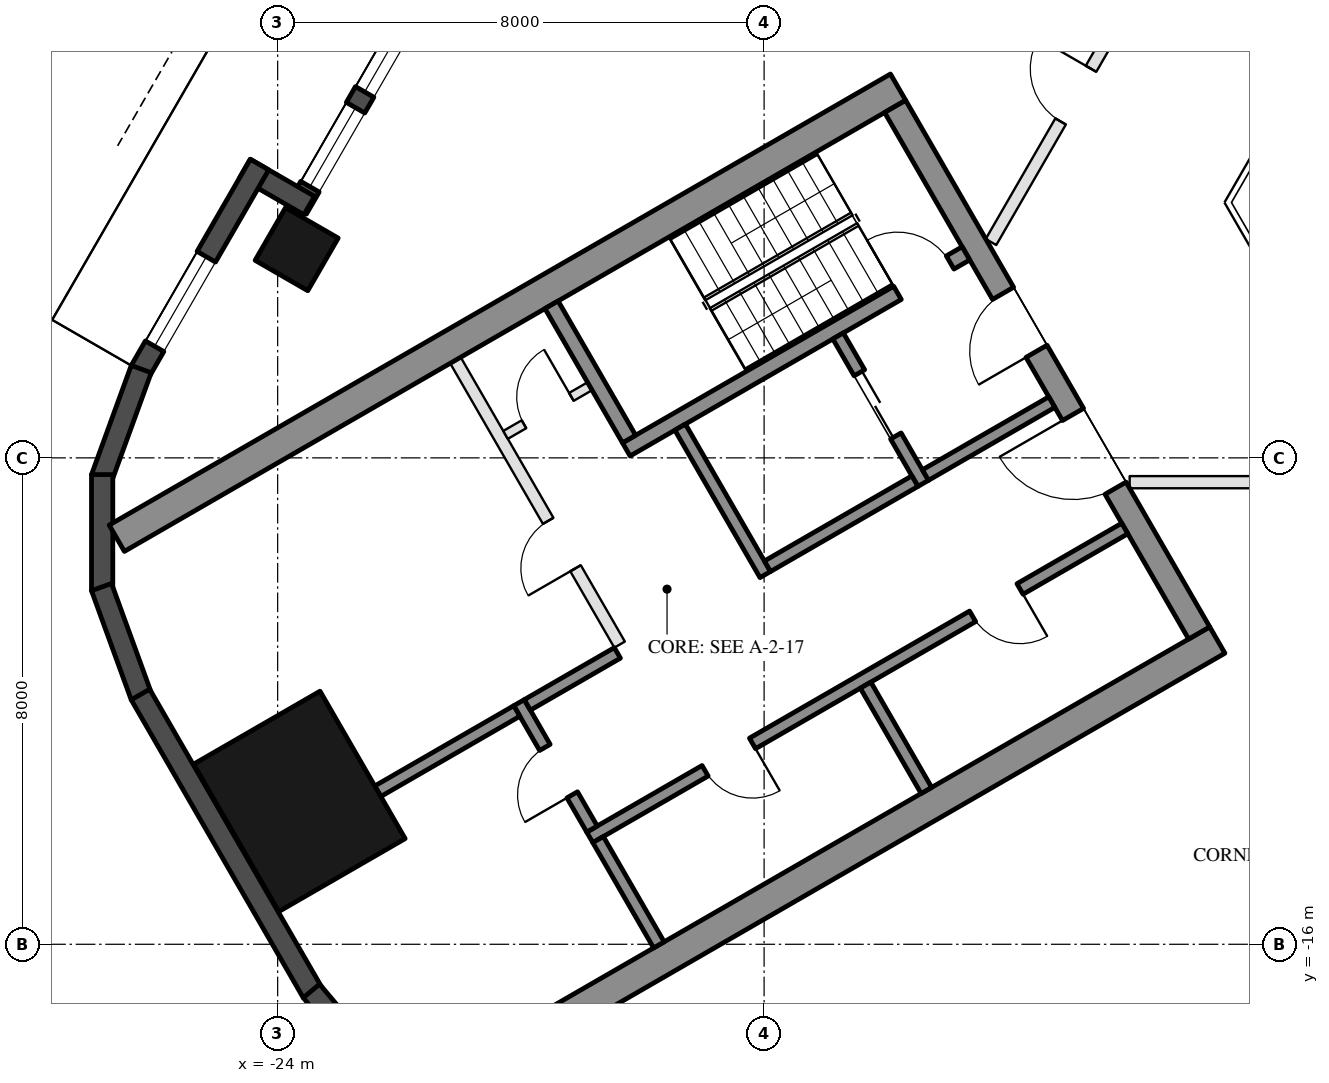
"""IFC4 building model, lengths in metres.
Left out: names, types, materials, properties, quantities, classifications, styles, units other than length and angle.
Written with IfcOpenShell. Run it as: python <this file> out.ifc"""

import sys

from ifc_helpers import new_model, si_unit, direction, frame, frame_2d, origin, origin_2d, place, context, subcontext, project, spatial, rectangle, hollow_rectangle, extrude, element, fill, save


model = new_model("IFC4")
c1 = context("Model", 3, precision=1e-05, world=origin(), true_north=direction((0.0, 1.0)))
c2 = subcontext(c1, "Body", "Model", "MODEL_VIEW")
j1 = project(units=[si_unit("LENGTHUNIT", "METRE"), si_unit("PLANEANGLEUNIT", "RADIAN")], contexts=[c1])
p1 = place(None, origin())
s1 = spatial("IfcSite", under=j1, at=p1, CompositionType="ELEMENT")
p2 = place(p1, origin())
s2 = spatial("IfcBuilding", under=s1, at=p2, CompositionType="ELEMENT")
p3 = place(p2, frame((0.0, 0.0, 83.5)))
s3 = spatial("IfcBuildingStorey", under=s2, at=p3, CompositionType="ELEMENT", Elevation=83.5)
p4 = place(p3, frame((-23.688, -4.568, 0.0), z_axis=(0.0, 0.0, 1.0), x_axis=(0.5, 0.866025403784, 0.0)))
e1 = element("IfcColumn", 1, at=p4, inside=s3, PredefinedType="COLUMN", context=c2, shape_type="SweptSolid", body=[
    extrude(hollow_rectangle(XDim=1.0, YDim=1.0, WallThickness=0.045, at=origin_2d()), origin(), (0.0, 0.0, 1.0), 3.7),
])
p5 = place(p3, frame((-23.643, -13.65, 0.0), z_axis=(0.0, 0.0, 1.0), x_axis=(-0.5, 0.866025403784, 0.0)))
e2 = element("IfcColumn", 2, at=p5, inside=s3, PredefinedType="COLUMN", context=c2, shape_type="SweptSolid", body=[
    extrude(hollow_rectangle(XDim=2.8, YDim=2.4, WallThickness=0.07, at=origin_2d()), origin(), (0.0, 0.0, 1.0), 3.7),
])
p6 = place(p3, frame((-20.309, 1.934, 0.0), z_axis=(0.0, 0.0, 1.0), x_axis=(-0.499992114976, -0.866029956157, 0.0)))
e3 = element("IfcWall", 3, at=p6, inside=s3, PredefinedType="SOLIDWALL", context=c2, shape_type="SweptSolid", body=[
    extrude(rectangle(XDim=6.74, YDim=0.35, at=frame_2d((3.37, 0.0))), origin(), (0.0, 0.0, 1.0), 3.55),
])
p7 = place(p6, frame((0.32, 0.0, 0.0)))
e4 = element("IfcOpeningElement", 4, at=p7, cuts=e3, PredefinedType="OPENING", context=c2, shape_type="SweptSolid", body=[
    extrude(rectangle(XDim=2.4, YDim=2.4, at=frame_2d((1.2, 1.2))), frame((0.0, 0.185, 0.0), z_axis=(0.0, -1.0, 0.0), x_axis=(1.0, 0.0, 0.0)), (0.0, 0.0, 1.0), 0.37),
])
p8 = place(p6, frame((3.02, 0.0, 0.3)))
e5 = element("IfcOpeningElement", 5, at=p8, cuts=e3, PredefinedType="OPENING", context=c2, shape_type="SweptSolid", body=[
    extrude(rectangle(XDim=1.5, YDim=2.65, at=frame_2d((0.75, 1.325))), frame((0.0, 0.185, 0.0), z_axis=(0.0, -1.0, 0.0), x_axis=(1.0, 0.0, 0.0)), (0.0, 0.0, 1.0), 0.37),
])
p9 = place(p6, frame((4.82, 0.0, 0.3)))
e6 = element("IfcOpeningElement", 6, at=p9, cuts=e3, PredefinedType="OPENING", context=c2, shape_type="SweptSolid", body=[
    extrude(rectangle(XDim=1.5, YDim=2.65, at=frame_2d((0.75, 1.325))), frame((0.0, 0.185, 0.0), z_axis=(0.0, -1.0, 0.0), x_axis=(1.0, 0.0, 0.0)), (0.0, 0.0, 1.0), 0.37),
])
p10 = place(p3, frame((-23.481, -3.85, 0.0), z_axis=(0.0, 0.0, 1.0), x_axis=(-0.866092288191, 0.499884134912, 0.0)))
e7 = element("IfcWall", 7, at=p10, inside=s3, PredefinedType="SOLIDWALL", context=c2, shape_type="SweptSolid", body=[
    extrude(rectangle(XDim=1.22, YDim=0.35, at=frame_2d((0.61, 0.0))), origin(), (0.0, 0.0, 1.0), 3.55),
])
p11 = place(p3, frame((-24.299, -3.176, 0.0), z_axis=(0.0, 0.0, 1.0), x_axis=(-0.500028278809, -0.866009076391, 0.0)))
e8 = element("IfcWall", 8, at=p11, inside=s3, PredefinedType="SOLIDWALL", context=c2, shape_type="SweptSolid", body=[
    extrude(rectangle(XDim=3.916, YDim=0.35, at=frame_2d((1.958, 0.0))), origin(), (0.0, 0.0, 1.0), 3.55),
])
p12 = place(p11, frame((1.75, 0.0, 0.3)))
e9 = element("IfcOpeningElement", 9, at=p12, cuts=e8, PredefinedType="OPENING", context=c2, shape_type="SweptSolid", body=[
    extrude(rectangle(XDim=1.7, YDim=2.65, at=frame_2d((0.85, 1.325))), frame((0.0, 0.185, 0.0), z_axis=(0.0, -1.0, 0.0), x_axis=(1.0, 0.0, 0.0)), (0.0, 0.0, 1.0), 0.37),
])
for number, where, z_axis, x_axis in (
    (10, (-26.244, -6.54, 0.0), (0.0, 0.0, 1.0), (-0.342, -0.94, 0.0)),
    (11, (-26.886, -8.275, 0.0), (0.0, 0.0, 1.0), (0.0, -1.0, 0.0)),
    (12, (-26.897, -10.125, 0.0), (0.0, 0.0, 1.0), (0.342, -0.94, 0.0)),
):
    element("IfcWall", number, at=place(p3, frame(where, z_axis=z_axis, x_axis=x_axis)), inside=s3, PredefinedType="SOLIDWALL", context=c2, shape_type="SweptSolid", body=[
        extrude(rectangle(XDim=1.91, YDim=0.35, at=frame_2d((0.955, 0.0))), origin(), (0.0, 0.0, 1.0), 3.55),
    ])
p13 = place(p3, frame((-26.257, -11.893, 0.0), z_axis=(0.0, 0.0, 1.0), x_axis=(0.500018773155, -0.866014564827, 0.0)))
e13 = element("IfcWall", 13, at=p13, inside=s3, PredefinedType="SOLIDWALL", context=c2, shape_type="SweptSolid", body=[
    extrude(rectangle(XDim=5.658, YDim=0.35, at=frame_2d((2.829, 0.0))), origin(), (0.0, 0.0, 1.0), 3.55),
])
p14 = place(p3, frame((-23.445, -16.768, 0.0), z_axis=(0.0, 0.0, 1.0), x_axis=(0.642733291068, -0.76609001857, 0.0)))
e14 = element("IfcWall", 14, at=p14, inside=s3, PredefinedType="SOLIDWALL", context=c2, shape_type="SweptSolid", body=[
    extrude(rectangle(XDim=1.91, YDim=0.35, at=frame_2d((0.955, 0.0))), origin(), (0.0, 0.0, 1.0), 3.55),
])
for number, where, z_axis, x_axis in (
    (15, (-13.797, -1.903, 0.0), (0.0, 0.0, 1.0), (-0.866, -0.5, 0.0)),
    (16, (-8.547, -10.997, 0.0), (0.0, 0.0, 1.0), (-0.866, -0.5, 0.0)),
):
    element("IfcWall", number, at=place(p3, frame(where, z_axis=z_axis, x_axis=x_axis)), inside=s3, PredefinedType="SHEAR", context=c2, shape_type="SweptSolid", body=[
        extrude(rectangle(XDim=14.837, YDim=0.5, at=frame_2d((7.418, 0.0))), origin(), (0.0, 0.0, 1.0), 3.5),
    ])
p15 = place(p3, frame((-13.845, -2.22, 0.0), z_axis=(0.0, 0.0, 1.0), x_axis=(0.500004234368, -0.866022959057, 0.0)))
e17 = element("IfcWall", 17, at=p15, inside=s3, PredefinedType="SHEAR", context=c2, shape_type="SweptSolid", body=[
    extrude(rectangle(XDim=10.0, YDim=0.4, at=frame_2d((5.0, 0.0))), origin(), (0.0, 0.0, 1.0), 3.5),
])
p16 = place(p15, frame((3.55, 0.0, 0.0)))
e18 = element("IfcOpeningElement", 18, at=p16, cuts=e17, PredefinedType="OPENING", context=c2, shape_type="SweptSolid", body=[
    extrude(rectangle(XDim=1.1, YDim=2.1, at=frame_2d((0.55, 1.05))), frame((0.0, 0.21, 0.0), z_axis=(0.0, -1.0, 0.0), x_axis=(1.0, 0.0, 0.0)), (0.0, 0.0, 1.0), 0.42),
])
p17 = place(p15, frame((5.85, 0.0, 0.0)))
e19 = element("IfcOpeningElement", 19, at=p17, cuts=e17, PredefinedType="OPENING", context=c2, shape_type="SweptSolid", body=[
    extrude(rectangle(XDim=1.4, YDim=2.1, at=frame_2d((0.7, 1.05))), frame((0.0, 0.21, 0.0), z_axis=(0.0, -1.0, 0.0), x_axis=(1.0, 0.0, 0.0)), (0.0, 0.0, 1.0), 0.42),
])
p18 = place(p3, frame((-12.681, -4.636, 0.0), z_axis=(0.0, 0.0, 1.0), x_axis=(-0.866021702275, -0.500006411147, 0.0)))
e20 = element("IfcWall", 20, at=p18, inside=s3, PredefinedType="SHEAR", context=c2, shape_type="SweptSolid", body=[
    extrude(rectangle(XDim=6.45, YDim=0.25, at=frame_2d((3.225, 0.0))), origin(), (0.0, 0.0, 1.0), 3.5),
])
p19 = place(p18, frame((0.3, 0.0, 0.0)))
e21 = element("IfcOpeningElement", 21, at=p19, cuts=e20, PredefinedType="OPENING", context=c2, shape_type="SweptSolid", body=[
    extrude(rectangle(XDim=1.0, YDim=2.1, at=frame_2d((0.5, 1.05))), frame((0.0, 0.135, 0.0), z_axis=(0.0, -1.0, 0.0), x_axis=(1.0, 0.0, 0.0)), (0.0, 0.0, 1.0), 0.27),
])
p20 = place(p3, frame((-19.496, -5.482, 0.0), z_axis=(0.0, 0.0, 1.0), x_axis=(0.499990435942, -0.866030925526, 0.0)))
e22 = element("IfcWall", 22, at=p20, inside=s3, PredefinedType="SHEAR", context=c2, shape_type="SweptSolid", body=[
    extrude(rectangle(XDim=2.55, YDim=0.25, at=frame_2d((1.275, 0.0))), origin(), (0.0, 0.0, 1.0), 3.5),
])
p21 = place(p3, frame((-17.381, -7.495, 0.0), z_axis=(0.0, 0.0, 1.0), x_axis=(0.500011755427, -0.866018616679, 0.0)))
e23 = element("IfcWall", 23, at=p21, inside=s3, PredefinedType="SHEAR", context=c2, shape_type="SweptSolid", body=[
    extrude(rectangle(XDim=2.8, YDim=0.2, at=frame_2d((1.4, 0.0))), origin(), (0.0, 0.0, 1.0), 3.5),
])
p22 = place(p3, frame((-14.783, -5.995, 0.0), z_axis=(0.0, 0.0, 1.0), x_axis=(0.49994636267, -0.866056369097, 0.0)))
e24 = element("IfcWall", 24, at=p22, inside=s3, PredefinedType="SHEAR", context=c2, shape_type="SweptSolid", body=[
    extrude(rectangle(XDim=2.8, YDim=0.2, at=frame_2d((1.4, 0.0))), origin(), (0.0, 0.0, 1.0), 3.5),
])
p23 = place(p22, frame((0.7, 0.0, 0.0)))
e25 = element("IfcOpeningElement", 25, at=p23, cuts=e24, PredefinedType="OPENING", context=c2, shape_type="SweptSolid", body=[
    extrude(rectangle(XDim=1.2, YDim=2.1, at=frame_2d((0.6, 1.05))), frame((0.0, 0.11, 0.0), z_axis=(0.0, -1.0, 0.0), x_axis=(1.0, 0.0, 0.0)), (0.0, 0.0, 1.0), 0.22),
])
p24 = place(p3, frame((-13.52, -8.383, 0.0), z_axis=(0.0, 0.0, 1.0), x_axis=(-0.866034573852, -0.49998411664, 0.0)))
e26 = element("IfcWall", 26, at=p24, inside=s3, PredefinedType="SHEAR", context=c2, shape_type="SweptSolid", body=[
    extrude(rectangle(XDim=2.8, YDim=0.2, at=frame_2d((1.4, 0.0))), origin(), (0.0, 0.0, 1.0), 3.5),
])
p25 = place(p3, frame((-11.268, -7.083, 0.0), z_axis=(0.0, 0.0, 1.0), x_axis=(-0.866050077142, -0.499957262057, 0.0)))
e27 = element("IfcWall", 27, at=p25, inside=s3, PredefinedType="SHEAR", context=c2, shape_type="SweptSolid", body=[
    extrude(rectangle(XDim=2.4, YDim=0.2, at=frame_2d((1.2, 0.0))), origin(), (0.0, 0.0, 1.0), 3.5),
])
p26 = place(p3, frame((-10.068, -9.162, 0.0), z_axis=(0.0, 0.0, 1.0), x_axis=(-0.866032725843, -0.499987317609, 0.0)))
e28 = element("IfcWall", 28, at=p26, inside=s3, PredefinedType="SHEAR", context=c2, shape_type="SweptSolid", body=[
    extrude(rectangle(XDim=10.16, YDim=0.2, at=frame_2d((5.08, 0.0))), origin(), (0.0, 0.0, 1.0), 3.5),
])
p27 = place(p26, frame((1.99, 0.0, 0.0)))
e29 = element("IfcOpeningElement", 29, at=p27, cuts=e28, PredefinedType="OPENING", context=c2, shape_type="SweptSolid", body=[
    extrude(rectangle(XDim=0.9, YDim=2.1, at=frame_2d((0.45, 1.05))), frame((0.0, 0.11, 0.0), z_axis=(0.0, -1.0, 0.0), x_axis=(1.0, 0.0, 0.0)), (0.0, 0.0, 1.0), 0.22),
])
p28 = place(p26, frame((7.07, 0.0, 0.0)))
e30 = element("IfcOpeningElement", 30, at=p28, cuts=e28, PredefinedType="OPENING", context=c2, shape_type="SweptSolid", body=[
    extrude(rectangle(XDim=0.9, YDim=2.1, at=frame_2d((0.45, 1.05))), frame((0.0, 0.11, 0.0), z_axis=(0.0, -1.0, 0.0), x_axis=(1.0, 0.0, 0.0)), (0.0, 0.0, 1.0), 0.22),
])
p29 = place(p3, frame((-20.031, -12.026, 0.0), z_axis=(0.0, 0.0, 1.0), x_axis=(0.500033551112, -0.866006032174, 0.0)))
e31 = element("IfcWall", 31, at=p29, inside=s3, PredefinedType="SHEAR", context=c2, shape_type="SweptSolid", body=[
    extrude(rectangle(XDim=2.4, YDim=0.2, at=frame_2d((1.2, 0.0))), origin(), (0.0, 0.0, 1.0), 3.5),
])
p30 = place(p29, frame((0.85, 0.0, 0.0)))
e32 = element("IfcOpeningElement", 32, at=p30, cuts=e31, PredefinedType="OPENING", context=c2, shape_type="SweptSolid", body=[
    extrude(rectangle(XDim=0.9, YDim=2.1, at=frame_2d((0.45, 1.05))), frame((0.0, 0.11, 0.0), z_axis=(0.0, -1.0, 0.0), x_axis=(1.0, 0.0, 0.0)), (0.0, 0.0, 1.0), 0.22),
])
p31 = place(p3, frame((-18.413, -11.208, 0.0), z_axis=(0.0, 0.0, 1.0), x_axis=(-0.866038183914, -0.499977863513, 0.0)))
e33 = element("IfcWall", 33, at=p31, inside=s3, PredefinedType="SHEAR", context=c2, shape_type="SweptSolid", body=[
    extrude(rectangle(XDim=1.71, YDim=0.2, at=frame_2d((0.855, 0.0))), origin(), (0.0, 0.0, 1.0), 3.5),
])
for number, where, z_axis, x_axis in (
    (34, (-14.331, -11.738, 0.0), (0.0, 0.0, 1.0), (0.5, -0.866, 0.0)),
    (35, (-18.73, -14.278, 0.0), (0.0, 0.0, 1.0), (0.5, -0.866, 0.0)),
):
    element("IfcWall", number, at=place(p3, frame(where, z_axis=z_axis, x_axis=x_axis)), inside=s3, PredefinedType="SHEAR", context=c2, shape_type="SweptSolid", body=[
        extrude(rectangle(XDim=2.0, YDim=0.2, at=frame_2d((1.0, 0.0))), origin(), (0.0, 0.0, 1.0), 3.5),
    ])
p32 = place(p3, frame((-20.067, -12.163, 0.0), z_axis=(0.0, 0.0, 1.0), x_axis=(-0.866060851709, -0.499938597367, 0.0)))
e36 = element("IfcWall", 36, at=p32, inside=s3, PredefinedType="SHEAR", context=c2, shape_type="SweptSolid", body=[
    extrude(rectangle(XDim=2.64, YDim=0.2, at=frame_2d((1.32, 0.0))), origin(), (0.0, 0.0, 1.0), 3.5),
])
p33 = place(p3, frame((-21.076, -6.395, 0.0), z_axis=(0.0, 0.0, 1.0), x_axis=(0.50001468107, -0.866016927499, 0.0)))
e37 = element("IfcWall", 37, at=p33, inside=s3, PredefinedType="PARTITIONING", context=c2, shape_type="SweptSolid", body=[
    extrude(rectangle(XDim=5.4, YDim=0.2, at=frame_2d((2.7, 0.0))), origin(), (0.0, 0.0, 1.0), 3.5),
])
p34 = place(p33, frame((3.05, 0.0, 0.0)))
e38 = element("IfcOpeningElement", 38, at=p34, cuts=e37, PredefinedType="OPENING", context=c2, shape_type="SweptSolid", body=[
    extrude(rectangle(XDim=0.9, YDim=2.1, at=frame_2d((0.45, 1.05))), frame((0.0, 0.11, 0.0), z_axis=(0.0, -1.0, 0.0), x_axis=(1.0, 0.0, 0.0)), (0.0, 0.0, 1.0), 0.22),
])
p35 = place(p3, frame((-18.866, -6.822, 0.0), z_axis=(0.0, 0.0, 1.0), x_axis=(-0.866028054938, -0.499995408039, 0.0)))
e39 = element("IfcWall", 39, at=p35, inside=s3, PredefinedType="PARTITIONING", context=c2, shape_type="SweptSolid", body=[
    extrude(rectangle(XDim=1.6, YDim=0.15, at=frame_2d((0.8, 0.0))), origin(), (0.0, 0.0, 1.0), 3.5),
])
p36 = place(p35, frame((0.35, 0.0, 0.0)))
e40 = element("IfcOpeningElement", 40, at=p36, cuts=e39, PredefinedType="OPENING", context=c2, shape_type="SweptSolid", body=[
    extrude(rectangle(XDim=0.9, YDim=2.1, at=frame_2d((0.45, 1.05))), frame((0.0, 0.085, 0.0), z_axis=(0.0, -1.0, 0.0), x_axis=(1.0, 0.0, 0.0)), (0.0, 0.0, 1.0), 0.17),
])
p37 = place(p3, frame((-2.702, -8.4, 0.0), z_axis=(0.0, 0.0, 1.0), x_axis=(-1.0, 0.0, 0.0)))
e41 = element("IfcWall", 41, at=p37, inside=s3, PredefinedType="PARTITIONING", context=c2, shape_type="SweptSolid", body=[
    extrude(rectangle(XDim=7.286, YDim=0.2, at=frame_2d((3.643, 0.0))), origin(), (0.0, 0.0, 1.0), 2.95),
])
p38 = place(p37, frame((3.143, 0.0, 0.0)))
e42 = element("IfcOpeningElement", 42, at=p38, cuts=e41, PredefinedType="OPENING", context=c2, shape_type="SweptSolid", body=[
    extrude(rectangle(XDim=1.0, YDim=2.1, at=frame_2d((0.5, 1.05))), frame((0.0, 0.11, 0.0), z_axis=(0.0, -1.0, 0.0), x_axis=(1.0, 0.0, 0.0)), (0.0, 0.0, 1.0), 0.22),
])
p39 = place(p3, frame((-12.269, -4.45, 0.0), z_axis=(0.0, 0.0, 1.0), x_axis=(0.500016608416, 0.866015814699, 0.0)))
e43 = element("IfcWall", 43, at=p39, inside=s3, PredefinedType="PARTITIONING", context=c2, shape_type="SweptSolid", body=[
    extrude(rectangle(XDim=5.58, YDim=0.2, at=frame_2d((2.79, 0.0))), origin(), (0.0, 0.0, 1.0), 2.95),
])
p40 = place(p39, frame((2.29, 0.0, 0.0)))
e44 = element("IfcOpeningElement", 44, at=p40, cuts=e43, PredefinedType="OPENING", context=c2, shape_type="SweptSolid", body=[
    extrude(rectangle(XDim=1.0, YDim=2.1, at=frame_2d((0.5, 1.05))), frame((0.0, 0.11, 0.0), z_axis=(0.0, -1.0, 0.0), x_axis=(1.0, 0.0, 0.0)), (0.0, 0.0, 1.0), 0.22),
])
p41 = place(p8, origin())
e45 = element("IfcWindow", 45, at=p41, inside=s3, PartitioningType="SINGLE_PANEL", PredefinedType="WINDOW", context=c2, shape_type="SweptSolid", body=[
    extrude(rectangle(XDim=1.5, YDim=2.65, at=frame_2d((0.75, 1.325))), frame((0.0, 0.03, 0.0), z_axis=(0.0, -1.0, 0.0), x_axis=(1.0, 0.0, 0.0)), (0.0, 0.0, 1.0), 0.06),
])
fill(e5, e45)
p42 = place(p9, origin())
e46 = element("IfcWindow", 46, at=p42, inside=s3, PartitioningType="SINGLE_PANEL", PredefinedType="WINDOW", context=c2, shape_type="SweptSolid", body=[
    extrude(rectangle(XDim=1.5, YDim=2.65, at=frame_2d((0.75, 1.325))), frame((0.0, 0.03, 0.0), z_axis=(0.0, -1.0, 0.0), x_axis=(1.0, 0.0, 0.0)), (0.0, 0.0, 1.0), 0.06),
])
fill(e6, e46)
p43 = place(p12, origin())
e47 = element("IfcWindow", 47, at=p43, inside=s3, PartitioningType="SINGLE_PANEL", PredefinedType="WINDOW", context=c2, shape_type="SweptSolid", body=[
    extrude(rectangle(XDim=1.7, YDim=2.65, at=frame_2d((0.85, 1.325))), frame((0.0, 0.03, 0.0), z_axis=(0.0, -1.0, 0.0), x_axis=(1.0, 0.0, 0.0)), (0.0, 0.0, 1.0), 0.06),
])
fill(e9, e47)
p44 = place(p23, origin())
e48 = element("IfcDoor", 48, at=p44, inside=s3, OperationType="DOUBLE_DOOR_SLIDING", PredefinedType="DOOR", context=c2, shape_type="SweptSolid", body=[
    extrude(rectangle(XDim=1.2, YDim=2.1, at=frame_2d((0.6, 1.05))), frame((0.0, 0.025, 0.0), z_axis=(0.0, -1.0, 0.0), x_axis=(1.0, 0.0, 0.0)), (0.0, 0.0, 1.0), 0.05),
])
fill(e25, e48)
p45 = place(p36, frame((0.9, 0.0, 0.0), z_axis=(0.0, 0.0, 1.0), x_axis=(-1.0, 0.0, 0.0)))
e49 = element("IfcDoor", 49, at=p45, inside=s3, OperationType="SINGLE_SWING_RIGHT", PredefinedType="DOOR", context=c2, shape_type="SweptSolid", body=[
    extrude(rectangle(XDim=0.9, YDim=2.1, at=frame_2d((0.45, 1.05))), frame((0.0, 0.025, 0.0), z_axis=(0.0, -1.0, 0.0), x_axis=(1.0, 0.0, 0.0)), (0.0, 0.0, 1.0), 0.05),
])
fill(e40, e49)
p46 = place(p27, origin())
e50 = element("IfcDoor", 50, at=p46, inside=s3, OperationType="SINGLE_SWING_LEFT", PredefinedType="DOOR", context=c2, shape_type="SweptSolid", body=[
    extrude(rectangle(XDim=0.9, YDim=2.1, at=frame_2d((0.45, 1.05))), frame((0.0, 0.025, 0.0), z_axis=(0.0, -1.0, 0.0), x_axis=(1.0, 0.0, 0.0)), (0.0, 0.0, 1.0), 0.05),
])
fill(e29, e50)
p47 = place(p28, origin())
e51 = element("IfcDoor", 51, at=p47, inside=s3, OperationType="SINGLE_SWING_LEFT", PredefinedType="DOOR", context=c2, shape_type="SweptSolid", body=[
    extrude(rectangle(XDim=0.9, YDim=2.1, at=frame_2d((0.45, 1.05))), frame((0.0, 0.025, 0.0), z_axis=(0.0, -1.0, 0.0), x_axis=(1.0, 0.0, 0.0)), (0.0, 0.0, 1.0), 0.05),
])
fill(e30, e51)
p48 = place(p30, frame((0.9, 0.0, 0.0), z_axis=(0.0, 0.0, 1.0), x_axis=(-1.0, 0.0, 0.0)))
e52 = element("IfcDoor", 52, at=p48, inside=s3, OperationType="SINGLE_SWING_LEFT", PredefinedType="DOOR", context=c2, shape_type="SweptSolid", body=[
    extrude(rectangle(XDim=0.9, YDim=2.1, at=frame_2d((0.45, 1.05))), frame((0.0, 0.025, 0.0), z_axis=(0.0, -1.0, 0.0), x_axis=(1.0, 0.0, 0.0)), (0.0, 0.0, 1.0), 0.05),
])
fill(e32, e52)
p49 = place(p34, frame((0.9, 0.0, 0.0), z_axis=(0.0, 0.0, 1.0), x_axis=(-1.0, 0.0, 0.0)))
e53 = element("IfcDoor", 53, at=p49, inside=s3, OperationType="SINGLE_SWING_LEFT", PredefinedType="DOOR", context=c2, shape_type="SweptSolid", body=[
    extrude(rectangle(XDim=0.9, YDim=2.1, at=frame_2d((0.45, 1.05))), frame((0.0, 0.025, 0.0), z_axis=(0.0, -1.0, 0.0), x_axis=(1.0, 0.0, 0.0)), (0.0, 0.0, 1.0), 0.05),
])
fill(e38, e53)
p50 = place(p16, frame((1.1, 0.0, 0.0), z_axis=(0.0, 0.0, 1.0), x_axis=(-1.0, 0.0, 0.0)))
e54 = element("IfcDoor", 54, at=p50, inside=s3, OperationType="SINGLE_SWING_LEFT", PredefinedType="DOOR", context=c2, shape_type="SweptSolid", body=[
    extrude(rectangle(XDim=1.1, YDim=2.1, at=frame_2d((0.55, 1.05))), frame((0.0, 0.025, 0.0), z_axis=(0.0, -1.0, 0.0), x_axis=(1.0, 0.0, 0.0)), (0.0, 0.0, 1.0), 0.05),
])
fill(e18, e54)
p51 = place(p17, frame((1.4, 0.0, 0.0), z_axis=(0.0, 0.0, 1.0), x_axis=(-1.0, 0.0, 0.0)))
e55 = element("IfcDoor", 55, at=p51, inside=s3, OperationType="DOUBLE_DOOR_SINGLE_SWING", PredefinedType="DOOR", context=c2, shape_type="SweptSolid", body=[
    extrude(rectangle(XDim=1.4, YDim=2.1, at=frame_2d((0.7, 1.05))), frame((0.0, 0.025, 0.0), z_axis=(0.0, -1.0, 0.0), x_axis=(1.0, 0.0, 0.0)), (0.0, 0.0, 1.0), 0.05),
])
fill(e19, e55)
p52 = place(p19, frame((1.0, 0.0, 0.0), z_axis=(0.0, 0.0, 1.0), x_axis=(-1.0, 0.0, 0.0)))
e56 = element("IfcDoor", 56, at=p52, inside=s3, OperationType="SINGLE_SWING_LEFT", PredefinedType="DOOR", context=c2, shape_type="SweptSolid", body=[
    extrude(rectangle(XDim=1.0, YDim=2.1, at=frame_2d((0.5, 1.05))), frame((0.0, 0.025, 0.0), z_axis=(0.0, -1.0, 0.0), x_axis=(1.0, 0.0, 0.0)), (0.0, 0.0, 1.0), 0.05),
])
fill(e21, e56)
p53 = place(p40, origin())
e57 = element("IfcDoor", 57, at=p53, inside=s3, OperationType="SINGLE_SWING_RIGHT", PredefinedType="DOOR", context=c2, shape_type="SweptSolid", body=[
    extrude(rectangle(XDim=1.0, YDim=2.1, at=frame_2d((0.5, 1.05))), frame((0.0, 0.025, 0.0), z_axis=(0.0, -1.0, 0.0), x_axis=(1.0, 0.0, 0.0)), (0.0, 0.0, 1.0), 0.05),
])
fill(e44, e57)
save(model, sys.argv[1])
